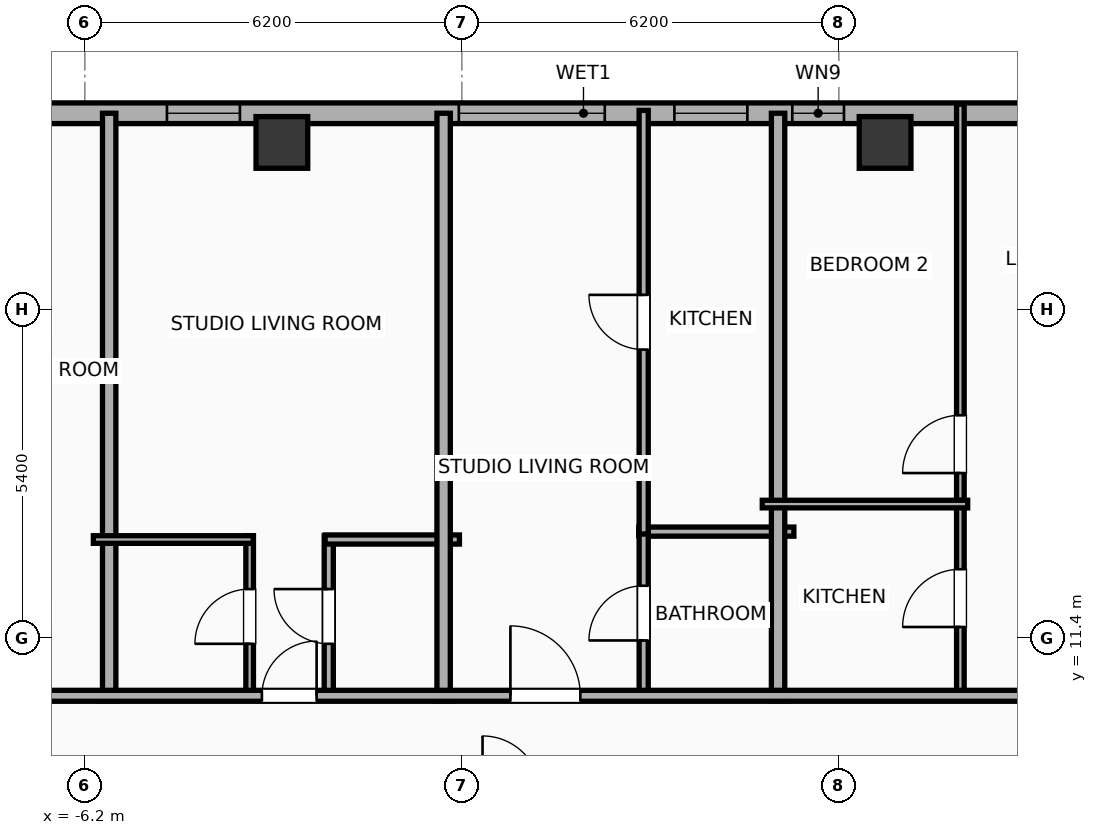
"""IFC4 building model, lengths in metres.
Left out: names, types, materials, properties, quantities, classifications, styles, units other than length and angle.
Written with IfcOpenShell. Run it as: python <this file> out.ifc"""

import sys

from ifc_helpers import new_model, si_unit, direction, frame, frame_2d, origin, origin_2d, place, context, subcontext, project, spatial, rectangle, hollow_rectangle, extrude, element, fill, save


model = new_model("IFC4")
c1 = context("Model", 3, precision=1e-05, world=origin(), true_north=direction((0.0, 1.0)))
c2 = subcontext(c1, "Body", "Model", "MODEL_VIEW")
j1 = project(units=[si_unit("LENGTHUNIT", "METRE"), si_unit("PLANEANGLEUNIT", "RADIAN")], contexts=[c1])
p1 = place(None, origin())
s1 = spatial("IfcSite", under=j1, at=p1, CompositionType="ELEMENT")
p2 = place(p1, origin())
s2 = spatial("IfcBuilding", under=s1, at=p2, CompositionType="ELEMENT")
p3 = place(p2, frame((0.0, 0.0, 239.2)))
s3 = spatial("IfcBuildingStorey", under=s2, at=p3, CompositionType="ELEMENT", Elevation=239.2)
for number, where, z_axis, x_axis in (
    (1, (6.96, 19.55, 0.0), (0.0, 0.0, 1.0), (1.0, 0.0, 0.0)),
    (2, (-2.96, 19.55, 0.0), (0.0, 0.0, 1.0), (1.0, 0.0, 0.0)),
):
    element("IfcColumn", number, at=place(p3, frame(where, z_axis=z_axis, x_axis=x_axis)), inside=s3, PredefinedType="COLUMN", context=c2, shape_type="SweptSolid", body=[
        extrude(hollow_rectangle(XDim=0.85, YDim=0.85, WallThickness=0.028, at=origin_2d()), origin(), (0.0, 0.0, 1.0), 3.9),
    ])
p4 = place(p3, frame((-22.783, 20.03, 0.0), z_axis=(0.0, 0.0, 1.0), x_axis=(1.0, 0.0, 0.0)))
e3 = element("IfcWall", 3, at=p4, inside=s3, PredefinedType="ELEMENTEDWALL", context=c2, shape_type="SweptSolid", body=[
    extrude(rectangle(XDim=49.566, YDim=0.34, at=frame_2d((24.783, 0.0))), origin(), (0.0, 0.0, 1.0), 3.65),
])
p5 = place(p4, frame((6.211, 0.0, 0.75)))
e4 = element("IfcOpeningElement", 4, at=p5, cuts=e3, PredefinedType="OPENING", context=c2, shape_type="SweptSolid", body=[
    extrude(rectangle(XDim=2.4, YDim=2.1, at=frame_2d((1.2, 1.05))), frame((0.0, 0.18, 0.0), z_axis=(0.0, -1.0, 0.0), x_axis=(1.0, 0.0, 0.0)), (0.0, 0.0, 1.0), 0.36),
])
p6 = place(p4, frame((22.733, 0.0, 0.75)))
e5 = element("IfcOpeningElement", 5, at=p6, cuts=e3, PredefinedType="OPENING", context=c2, shape_type="SweptSolid", body=[
    extrude(rectangle(XDim=2.4, YDim=2.1, at=frame_2d((1.2, 1.05))), frame((0.0, 0.18, 0.0), z_axis=(0.0, -1.0, 0.0), x_axis=(1.0, 0.0, 0.0)), (0.0, 0.0, 1.0), 0.36),
])
p7 = place(p4, frame((1.132, 0.0, 0.75)))
e6 = element("IfcOpeningElement", 6, at=p7, cuts=e3, PredefinedType="OPENING", context=c2, shape_type="SweptSolid", body=[
    extrude(rectangle(XDim=1.2, YDim=2.05, at=frame_2d((0.6, 1.025))), frame((0.0, 0.18, 0.0), z_axis=(0.0, -1.0, 0.0), x_axis=(1.0, 0.0, 0.0)), (0.0, 0.0, 1.0), 0.36),
])
p8 = place(p4, frame((3.678, 0.0, 0.75)))
e7 = element("IfcOpeningElement", 7, at=p8, cuts=e3, PredefinedType="OPENING", context=c2, shape_type="SweptSolid", body=[
    extrude(rectangle(XDim=1.2, YDim=2.05, at=frame_2d((0.6, 1.025))), frame((0.0, 0.18, 0.0), z_axis=(0.0, -1.0, 0.0), x_axis=(1.0, 0.0, 0.0)), (0.0, 0.0, 1.0), 0.36),
])
p9 = place(p4, frame((14.804, 0.0, 0.75)))
e8 = element("IfcOpeningElement", 8, at=p9, cuts=e3, PredefinedType="OPENING", context=c2, shape_type="SweptSolid", body=[
    extrude(rectangle(XDim=1.2, YDim=2.05, at=frame_2d((0.6, 1.025))), frame((0.0, 0.18, 0.0), z_axis=(0.0, -1.0, 0.0), x_axis=(1.0, 0.0, 0.0)), (0.0, 0.0, 1.0), 0.36),
])
p10 = place(p4, frame((12.054, 0.0, 0.75)))
e9 = element("IfcOpeningElement", 9, at=p10, cuts=e3, PredefinedType="OPENING", context=c2, shape_type="SweptSolid", body=[
    extrude(rectangle(XDim=1.2, YDim=2.05, at=frame_2d((0.6, 1.025))), frame((0.0, 0.18, 0.0), z_axis=(0.0, -1.0, 0.0), x_axis=(1.0, 0.0, 0.0)), (0.0, 0.0, 1.0), 0.36),
])
p11 = place(p4, frame((17.933, 0.0, 0.75)))
e10 = element("IfcOpeningElement", 10, at=p11, cuts=e3, PredefinedType="OPENING", context=c2, shape_type="SweptSolid", body=[
    extrude(rectangle(XDim=1.2, YDim=2.05, at=frame_2d((0.6, 1.025))), frame((0.0, 0.18, 0.0), z_axis=(0.0, -1.0, 0.0), x_axis=(1.0, 0.0, 0.0)), (0.0, 0.0, 1.0), 0.36),
])
p12 = place(p4, frame((26.278, 0.0, 0.75)))
e11 = element("IfcOpeningElement", 11, at=p12, cuts=e3, PredefinedType="OPENING", context=c2, shape_type="SweptSolid", body=[
    extrude(rectangle(XDim=1.2, YDim=2.05, at=frame_2d((0.6, 1.025))), frame((0.0, 0.18, 0.0), z_axis=(0.0, -1.0, 0.0), x_axis=(1.0, 0.0, 0.0)), (0.0, 0.0, 1.0), 0.36),
])
p13 = place(p4, frame((32.677, 0.0, 0.75)))
e12 = element("IfcOpeningElement", 12, at=p13, cuts=e3, PredefinedType="OPENING", context=c2, shape_type="SweptSolid", body=[
    extrude(rectangle(XDim=1.2, YDim=2.05, at=frame_2d((0.6, 1.025))), frame((0.0, 0.18, 0.0), z_axis=(0.0, -1.0, 0.0), x_axis=(1.0, 0.0, 0.0)), (0.0, 0.0, 1.0), 0.36),
])
p14 = place(p4, frame((28.217, 0.0, 0.75)))
e13 = element("IfcOpeningElement", 13, at=p14, cuts=e3, PredefinedType="OPENING", context=c2, shape_type="SweptSolid", body=[
    extrude(rectangle(XDim=0.85, YDim=2.05, at=frame_2d((0.425, 1.025))), frame((0.0, 0.18, 0.0), z_axis=(0.0, -1.0, 0.0), x_axis=(1.0, 0.0, 0.0)), (0.0, 0.0, 1.0), 0.36),
])
p15 = place(p4, frame((36.678, 0.0, 0.75)))
e14 = element("IfcOpeningElement", 14, at=p15, cuts=e3, PredefinedType="OPENING", context=c2, shape_type="SweptSolid", body=[
    extrude(rectangle(XDim=1.2, YDim=2.05, at=frame_2d((0.6, 1.025))), frame((0.0, 0.18, 0.0), z_axis=(0.0, -1.0, 0.0), x_axis=(1.0, 0.0, 0.0)), (0.0, 0.0, 1.0), 0.36),
])
p16 = place(p4, frame((40.307, 0.0, 0.75)))
e15 = element("IfcOpeningElement", 15, at=p16, cuts=e3, PredefinedType="OPENING", context=c2, shape_type="SweptSolid", body=[
    extrude(rectangle(XDim=1.2, YDim=2.05, at=frame_2d((0.6, 1.025))), frame((0.0, 0.18, 0.0), z_axis=(0.0, -1.0, 0.0), x_axis=(1.0, 0.0, 0.0)), (0.0, 0.0, 1.0), 0.36),
])
p17 = place(p4, frame((43.696, 0.0, 0.75)))
e16 = element("IfcOpeningElement", 16, at=p17, cuts=e3, PredefinedType="OPENING", context=c2, shape_type="SweptSolid", body=[
    extrude(rectangle(XDim=1.2, YDim=2.05, at=frame_2d((0.6, 1.025))), frame((0.0, 0.18, 0.0), z_axis=(0.0, -1.0, 0.0), x_axis=(1.0, 0.0, 0.0)), (0.0, 0.0, 1.0), 0.36),
])
p18 = place(p4, frame((46.739, 0.0, 0.75)))
e17 = element("IfcOpeningElement", 17, at=p18, cuts=e3, PredefinedType="OPENING", context=c2, shape_type="SweptSolid", body=[
    extrude(rectangle(XDim=1.2, YDim=2.05, at=frame_2d((0.6, 1.025))), frame((0.0, 0.18, 0.0), z_axis=(0.0, -1.0, 0.0), x_axis=(1.0, 0.0, 0.0)), (0.0, 0.0, 1.0), 0.36),
])
p19 = place(p3, frame((-5.8, 10.37, 0.0), z_axis=(0.0, 0.0, 1.0), x_axis=(0.0, 1.0, 0.0)))
e18 = element("IfcWall", 18, at=p19, inside=s3, PredefinedType="PARTITIONING", context=c2, shape_type="SweptSolid", body=[
    extrude(rectangle(XDim=9.66, YDim=0.22, at=frame_2d((4.83, 0.0))), origin(), (0.0, 0.0, 1.0), 3.65),
])
p20 = place(p3, frame((-3.49, 10.43, 0.0), z_axis=(0.0, 0.0, 1.0), x_axis=(0.0, 1.0, 0.0)))
e19 = element("IfcWall", 19, at=p20, inside=s3, PredefinedType="PARTITIONING", context=c2, shape_type="SweptSolid", body=[
    extrude(rectangle(XDim=2.65, YDim=0.125, at=frame_2d((1.325, 0.0))), origin(), (0.0, 0.0, 1.0), 3.09),
])
p21 = place(p20, frame((0.875, 0.0, 0.0)))
e20 = element("IfcOpeningElement", 20, at=p21, cuts=e19, PredefinedType="OPENING", context=c2, shape_type="SweptSolid", body=[
    extrude(rectangle(XDim=0.9, YDim=2.05, at=frame_2d((0.45, 1.025))), frame((0.0, 0.073, 0.0), z_axis=(0.0, -1.0, 0.0), x_axis=(1.0, 0.0, 0.0)), (0.0, 0.0, 1.0), 0.145),
])
p22 = place(p3, frame((-2.189, 10.43, 0.0), z_axis=(0.0, 0.0, 1.0), x_axis=(0.0, 1.0, 0.0)))
e21 = element("IfcWall", 21, at=p22, inside=s3, PredefinedType="PLUMBINGWALL", context=c2, shape_type="SweptSolid", body=[
    extrude(rectangle(XDim=2.65, YDim=0.15, at=frame_2d((1.325, 0.0))), origin(), (0.0, 0.0, 1.0), 3.65),
])
p23 = place(p22, frame((0.875, 0.0, 0.0)))
e22 = element("IfcOpeningElement", 22, at=p23, cuts=e21, PredefinedType="OPENING", context=c2, shape_type="SweptSolid", body=[
    extrude(rectangle(XDim=0.9, YDim=2.05, at=frame_2d((0.45, 1.025))), frame((0.0, 0.085, 0.0), z_axis=(0.0, -1.0, 0.0), x_axis=(1.0, 0.0, 0.0)), (0.0, 0.0, 1.0), 0.17),
])
p24 = place(p3, frame((-6.06, 13.02, 0.0), z_axis=(0.0, 0.0, 1.0), x_axis=(1.0, 0.0, 0.0)))
e23 = element("IfcWall", 23, at=p24, inside=s3, PredefinedType="PARTITIONING", context=c2, shape_type="SweptSolid", body=[
    extrude(rectangle(XDim=2.63, YDim=0.125, at=frame_2d((1.315, 0.0))), origin(), (0.0, 0.0, 1.0), 3.65),
])
p25 = place(p3, frame((-2.249, 13.02, 0.0), z_axis=(0.0, 0.0, 1.0), x_axis=(1.0, 0.0, 0.0)))
e24 = element("IfcWall", 24, at=p25, inside=s3, PredefinedType="PLUMBINGWALL", context=c2, shape_type="SweptSolid", body=[
    extrude(rectangle(XDim=2.209, YDim=0.15, at=frame_2d((1.104, 0.0))), origin(), (0.0, 0.0, 1.0), 3.65),
])
p26 = place(p3, frame((-0.3, 10.37, 0.0), z_axis=(0.0, 0.0, 1.0), x_axis=(0.0, 1.0, 0.0)))
e25 = element("IfcWall", 25, at=p26, inside=s3, PredefinedType="PARTITIONING", context=c2, shape_type="SweptSolid", body=[
    extrude(rectangle(XDim=9.66, YDim=0.22, at=frame_2d((4.83, 0.0))), origin(), (0.0, 0.0, 1.0), 3.65),
])
p27 = place(p3, frame((2.91, 13.15, 0.0), z_axis=(0.0, 0.0, 1.0), x_axis=(1.0, 0.0, 0.0)))
e26 = element("IfcWall", 26, at=p27, inside=s3, PredefinedType="PLUMBINGWALL", context=c2, shape_type="SweptSolid", body=[
    extrude(rectangle(XDim=2.55, YDim=0.15, at=frame_2d((1.275, 0.0))), origin(), (0.0, 0.0, 1.0), 3.65),
])
p28 = place(p3, frame((2.99, 10.43, 0.0), z_axis=(0.0, 0.0, 1.0), x_axis=(0.0, 1.0, 0.0)))
e27 = element("IfcWall", 27, at=p28, inside=s3, PredefinedType="PLUMBINGWALL", context=c2, shape_type="SweptSolid", body=[
    extrude(rectangle(XDim=2.76, YDim=0.15, at=frame_2d((1.38, 0.0))), origin(), (0.0, 0.0, 1.0), 3.65),
])
p29 = place(p28, frame((0.93, 0.0, 0.0)))
e28 = element("IfcOpeningElement", 28, at=p29, cuts=e27, PredefinedType="OPENING", context=c2, shape_type="SweptSolid", body=[
    extrude(rectangle(XDim=0.9, YDim=2.05, at=frame_2d((0.45, 1.025))), frame((0.0, 0.085, 0.0), z_axis=(0.0, -1.0, 0.0), x_axis=(1.0, 0.0, 0.0)), (0.0, 0.0, 1.0), 0.17),
])
p30 = place(p3, frame((2.99, 13.11, 0.0), z_axis=(0.0, 0.0, 1.0), x_axis=(0.0, 1.0, 0.0)))
e29 = element("IfcWall", 29, at=p30, inside=s3, PredefinedType="PLUMBINGWALL", context=c2, shape_type="SweptSolid", body=[
    extrude(rectangle(XDim=6.967, YDim=0.15, at=frame_2d((3.483, 0.0))), origin(), (0.0, 0.0, 1.0), 3.65),
])
p31 = place(p30, frame((3.033, 0.0, 0.0)))
e30 = element("IfcOpeningElement", 30, at=p31, cuts=e29, PredefinedType="OPENING", context=c2, shape_type="SweptSolid", body=[
    extrude(rectangle(XDim=0.9, YDim=2.05, at=frame_2d((0.45, 1.025))), frame((0.0, 0.085, 0.0), z_axis=(0.0, -1.0, 0.0), x_axis=(1.0, 0.0, 0.0)), (0.0, 0.0, 1.0), 0.17),
])
p32 = place(p3, frame((5.2, 10.37, 0.0), z_axis=(0.0, 0.0, 1.0), x_axis=(0.0, 1.0, 0.0)))
e31 = element("IfcWall", 31, at=p32, inside=s3, PredefinedType="PARTITIONING", context=c2, shape_type="SweptSolid", body=[
    extrude(rectangle(XDim=9.66, YDim=0.22, at=frame_2d((4.83, 0.0))), origin(), (0.0, 0.0, 1.0), 3.09),
])
p33 = place(p3, frame((8.198, 13.541, 0.0), z_axis=(0.0, 0.0, 1.0), x_axis=(0.0, 1.0, 0.0)))
e32 = element("IfcWall", 32, at=p33, inside=s3, PredefinedType="PARTITIONING", context=c2, shape_type="SweptSolid", body=[
    extrude(rectangle(XDim=6.639, YDim=0.125, at=frame_2d((3.32, 0.0))), origin(), (0.0, 0.0, 1.0), 3.65),
])
p34 = place(p33, frame((0.573, 0.0, 0.0)))
e33 = element("IfcOpeningElement", 33, at=p34, cuts=e32, PredefinedType="OPENING", context=c2, shape_type="SweptSolid", body=[
    extrude(rectangle(XDim=0.95, YDim=2.05, at=frame_2d((0.475, 1.025))), frame((0.0, 0.073, 0.0), z_axis=(0.0, -1.0, 0.0), x_axis=(1.0, 0.0, 0.0)), (0.0, 0.0, 1.0), 0.145),
])
p35 = place(p3, frame((8.198, 10.43, 0.0), z_axis=(0.0, 0.0, 1.0), x_axis=(0.0, 1.0, 0.0)))
e34 = element("IfcWall", 34, at=p35, inside=s3, PredefinedType="PARTITIONING", context=c2, shape_type="SweptSolid", body=[
    extrude(rectangle(XDim=3.236, YDim=0.125, at=frame_2d((1.618, 0.0))), origin(), (0.0, 0.0, 1.0), 3.65),
])
p36 = place(p35, frame((1.152, 0.0, 0.0)))
e35 = element("IfcOpeningElement", 35, at=p36, cuts=e34, PredefinedType="OPENING", context=c2, shape_type="SweptSolid", body=[
    extrude(rectangle(XDim=0.95, YDim=2.05, at=frame_2d((0.475, 1.025))), frame((0.0, 0.073, 0.0), z_axis=(0.0, -1.0, 0.0), x_axis=(1.0, 0.0, 0.0)), (0.0, 0.0, 1.0), 0.145),
])
p37 = place(p3, frame((4.94, 13.603, 0.0), z_axis=(0.0, 0.0, 1.0), x_axis=(1.0, 0.0, 0.0)))
e36 = element("IfcWall", 36, at=p37, inside=s3, PredefinedType="PARTITIONING", context=c2, shape_type="SweptSolid", body=[
    extrude(rectangle(XDim=3.378, YDim=0.125, at=frame_2d((1.689, 0.0))), origin(), (0.0, 0.0, 1.0), 3.65),
])
p38 = place(p3, frame((-26.23, 10.45, 0.0), z_axis=(0.0, 0.0, 1.0), x_axis=(1.0, 0.0, 0.0)))
e37 = element("IfcWall", 37, at=p38, inside=s3, PredefinedType="PARTITIONING", context=c2, shape_type="SweptSolid", body=[
    extrude(rectangle(XDim=56.46, YDim=0.18, at=frame_2d((28.23, 0.0))), origin(), (0.0, 0.0, 1.0), 3.65),
])
p39 = place(p38, frame((4.41, 0.0, 0.0)))
e38 = element("IfcOpeningElement", 38, at=p39, cuts=e37, PredefinedType="OPENING", context=c2, shape_type="SweptSolid", body=[
    extrude(rectangle(XDim=1.15, YDim=2.05, at=frame_2d((0.575, 1.025))), frame((0.0, 0.1, 0.0), z_axis=(0.0, -1.0, 0.0), x_axis=(1.0, 0.0, 0.0)), (0.0, 0.0, 1.0), 0.2),
])
p40 = place(p38, frame((11.943, 0.0, 0.0)))
e39 = element("IfcOpeningElement", 39, at=p40, cuts=e37, PredefinedType="OPENING", context=c2, shape_type="SweptSolid", body=[
    extrude(rectangle(XDim=0.9, YDim=2.05, at=frame_2d((0.45, 1.025))), frame((0.0, 0.1, 0.0), z_axis=(0.0, -1.0, 0.0), x_axis=(1.0, 0.0, 0.0)), (0.0, 0.0, 1.0), 0.2),
])
p41 = place(p38, frame((18.243, 0.0, 0.0)))
e40 = element("IfcOpeningElement", 40, at=p41, cuts=e37, PredefinedType="OPENING", context=c2, shape_type="SweptSolid", body=[
    extrude(rectangle(XDim=1.15, YDim=2.05, at=frame_2d((0.575, 1.025))), frame((0.0, 0.1, 0.0), z_axis=(0.0, -1.0, 0.0), x_axis=(1.0, 0.0, 0.0)), (0.0, 0.0, 1.0), 0.2),
])
p42 = place(p38, frame((22.941, 0.0, 0.0)))
e41 = element("IfcOpeningElement", 41, at=p42, cuts=e37, PredefinedType="OPENING", context=c2, shape_type="SweptSolid", body=[
    extrude(rectangle(XDim=0.9, YDim=2.05, at=frame_2d((0.45, 1.025))), frame((0.0, 0.1, 0.0), z_axis=(0.0, -1.0, 0.0), x_axis=(1.0, 0.0, 0.0)), (0.0, 0.0, 1.0), 0.2),
])
p43 = place(p38, frame((27.028, 0.0, 0.0)))
e42 = element("IfcOpeningElement", 42, at=p43, cuts=e37, PredefinedType="OPENING", context=c2, shape_type="SweptSolid", body=[
    extrude(rectangle(XDim=1.15, YDim=2.05, at=frame_2d((0.575, 1.025))), frame((0.0, 0.1, 0.0), z_axis=(0.0, -1.0, 0.0), x_axis=(1.0, 0.0, 0.0)), (0.0, 0.0, 1.0), 0.2),
])
p44 = place(p38, frame((36.864, 0.0, 0.0)))
e43 = element("IfcOpeningElement", 43, at=p44, cuts=e37, PredefinedType="OPENING", context=c2, shape_type="SweptSolid", body=[
    extrude(rectangle(XDim=1.15, YDim=2.05, at=frame_2d((0.575, 1.025))), frame((0.0, 0.1, 0.0), z_axis=(0.0, -1.0, 0.0), x_axis=(1.0, 0.0, 0.0)), (0.0, 0.0, 1.0), 0.2),
])
p45 = place(p38, frame((45.655, 0.0, 0.0)))
e44 = element("IfcOpeningElement", 44, at=p45, cuts=e37, PredefinedType="OPENING", context=c2, shape_type="SweptSolid", body=[
    extrude(rectangle(XDim=0.9, YDim=2.05, at=frame_2d((0.45, 1.025))), frame((0.0, 0.1, 0.0), z_axis=(0.0, -1.0, 0.0), x_axis=(1.0, 0.0, 0.0)), (0.0, 0.0, 1.0), 0.2),
])
p46 = place(p38, frame((52.576, 0.0, 0.0)))
e45 = element("IfcOpeningElement", 45, at=p46, cuts=e37, PredefinedType="OPENING", context=c2, shape_type="SweptSolid", body=[
    extrude(rectangle(XDim=1.15, YDim=2.05, at=frame_2d((0.575, 1.025))), frame((0.0, 0.1, 0.0), z_axis=(0.0, -1.0, 0.0), x_axis=(1.0, 0.0, 0.0)), (0.0, 0.0, 1.0), 0.2),
])
p47 = place(p6, origin())
e46 = element("IfcWindow", 46, at=p47, inside=s3, PartitioningType="SINGLE_PANEL", PredefinedType="WINDOW", context=c2, shape_type="SweptSolid", body=[
    extrude(rectangle(XDim=2.4, YDim=2.1, at=frame_2d((1.2, 1.05))), frame((0.0, 0.03, 0.0), z_axis=(0.0, -1.0, 0.0), x_axis=(1.0, 0.0, 0.0)), (0.0, 0.0, 1.0), 0.06),
])
fill(e5, e46)
p48 = place(p11, origin())
e47 = element("IfcWindow", 47, at=p48, inside=s3, PartitioningType="SINGLE_PANEL", PredefinedType="WINDOW", context=c2, shape_type="SweptSolid", body=[
    extrude(rectangle(XDim=1.2, YDim=2.05, at=frame_2d((0.6, 1.025))), frame((0.0, 0.03, 0.0), z_axis=(0.0, -1.0, 0.0), x_axis=(1.0, 0.0, 0.0)), (0.0, 0.0, 1.0), 0.06),
])
fill(e10, e47)
p49 = place(p12, origin())
e48 = element("IfcWindow", 48, at=p49, inside=s3, PartitioningType="SINGLE_PANEL", PredefinedType="WINDOW", context=c2, shape_type="SweptSolid", body=[
    extrude(rectangle(XDim=1.2, YDim=2.05, at=frame_2d((0.6, 1.025))), frame((0.0, 0.03, 0.0), z_axis=(0.0, -1.0, 0.0), x_axis=(1.0, 0.0, 0.0)), (0.0, 0.0, 1.0), 0.06),
])
fill(e11, e48)
p50 = place(p14, origin())
e49 = element("IfcWindow", 49, at=p50, inside=s3, PartitioningType="SINGLE_PANEL", PredefinedType="WINDOW", context=c2, shape_type="SweptSolid", body=[
    extrude(rectangle(XDim=0.85, YDim=2.05, at=frame_2d((0.425, 1.025))), frame((0.0, 0.03, 0.0), z_axis=(0.0, -1.0, 0.0), x_axis=(1.0, 0.0, 0.0)), (0.0, 0.0, 1.0), 0.06),
])
fill(e13, e49)
p51 = place(p21, origin())
e50 = element("IfcDoor", 50, at=p51, inside=s3, OperationType="SINGLE_SWING_LEFT", PredefinedType="DOOR", context=c2, shape_type="SweptSolid", body=[
    extrude(rectangle(XDim=0.9, YDim=2.05, at=frame_2d((0.45, 1.025))), frame((0.0, 0.025, 0.0), z_axis=(0.0, -1.0, 0.0), x_axis=(1.0, 0.0, 0.0)), (0.0, 0.0, 1.0), 0.05),
])
fill(e20, e50)
p52 = place(p23, origin())
e51 = element("IfcDoor", 51, at=p52, inside=s3, OperationType="SINGLE_SWING_RIGHT", PredefinedType="DOOR", context=c2, shape_type="SweptSolid", body=[
    extrude(rectangle(XDim=0.9, YDim=2.05, at=frame_2d((0.45, 1.025))), frame((0.0, 0.025, 0.0), z_axis=(0.0, -1.0, 0.0), x_axis=(1.0, 0.0, 0.0)), (0.0, 0.0, 1.0), 0.05),
])
fill(e22, e51)
p53 = place(p29, origin())
e52 = element("IfcDoor", 52, at=p53, inside=s3, OperationType="SINGLE_SWING_LEFT", PredefinedType="DOOR", context=c2, shape_type="SweptSolid", body=[
    extrude(rectangle(XDim=0.9, YDim=2.05, at=frame_2d((0.45, 1.025))), frame((0.0, 0.025, 0.0), z_axis=(0.0, -1.0, 0.0), x_axis=(1.0, 0.0, 0.0)), (0.0, 0.0, 1.0), 0.05),
])
fill(e28, e52)
p54 = place(p31, origin())
e53 = element("IfcDoor", 53, at=p54, inside=s3, OperationType="SINGLE_SWING_RIGHT", PredefinedType="DOOR", context=c2, shape_type="SweptSolid", body=[
    extrude(rectangle(XDim=0.9, YDim=2.05, at=frame_2d((0.45, 1.025))), frame((0.0, 0.025, 0.0), z_axis=(0.0, -1.0, 0.0), x_axis=(1.0, 0.0, 0.0)), (0.0, 0.0, 1.0), 0.05),
])
fill(e30, e53)
p55 = place(p34, origin())
e54 = element("IfcDoor", 54, at=p55, inside=s3, OperationType="SINGLE_SWING_LEFT", PredefinedType="DOOR", context=c2, shape_type="SweptSolid", body=[
    extrude(rectangle(XDim=0.95, YDim=2.05, at=frame_2d((0.475, 1.025))), frame((0.0, 0.025, 0.0), z_axis=(0.0, -1.0, 0.0), x_axis=(1.0, 0.0, 0.0)), (0.0, 0.0, 1.0), 0.05),
])
fill(e33, e54)
p56 = place(p36, origin())
e55 = element("IfcDoor", 55, at=p56, inside=s3, OperationType="SINGLE_SWING_LEFT", PredefinedType="DOOR", context=c2, shape_type="SweptSolid", body=[
    extrude(rectangle(XDim=0.95, YDim=2.05, at=frame_2d((0.475, 1.025))), frame((0.0, 0.025, 0.0), z_axis=(0.0, -1.0, 0.0), x_axis=(1.0, 0.0, 0.0)), (0.0, 0.0, 1.0), 0.05),
])
fill(e35, e55)
p57 = place(p42, origin())
e56 = element("IfcDoor", 56, at=p57, inside=s3, OperationType="SINGLE_SWING_RIGHT", PredefinedType="DOOR", context=c2, shape_type="SweptSolid", body=[
    extrude(rectangle(XDim=0.9, YDim=2.05, at=frame_2d((0.45, 1.025))), frame((0.0, 0.025, 0.0), z_axis=(0.0, -1.0, 0.0), x_axis=(1.0, 0.0, 0.0)), (0.0, 0.0, 1.0), 0.05),
])
fill(e41, e56)
p58 = place(p43, origin())
e57 = element("IfcDoor", 57, at=p58, inside=s3, OperationType="SINGLE_SWING_LEFT", PredefinedType="DOOR", context=c2, shape_type="SweptSolid", body=[
    extrude(rectangle(XDim=1.15, YDim=2.05, at=frame_2d((0.575, 1.025))), frame((0.0, 0.025, 0.0), z_axis=(0.0, -1.0, 0.0), x_axis=(1.0, 0.0, 0.0)), (0.0, 0.0, 1.0), 0.05),
])
fill(e42, e57)
save(model, sys.argv[1])
